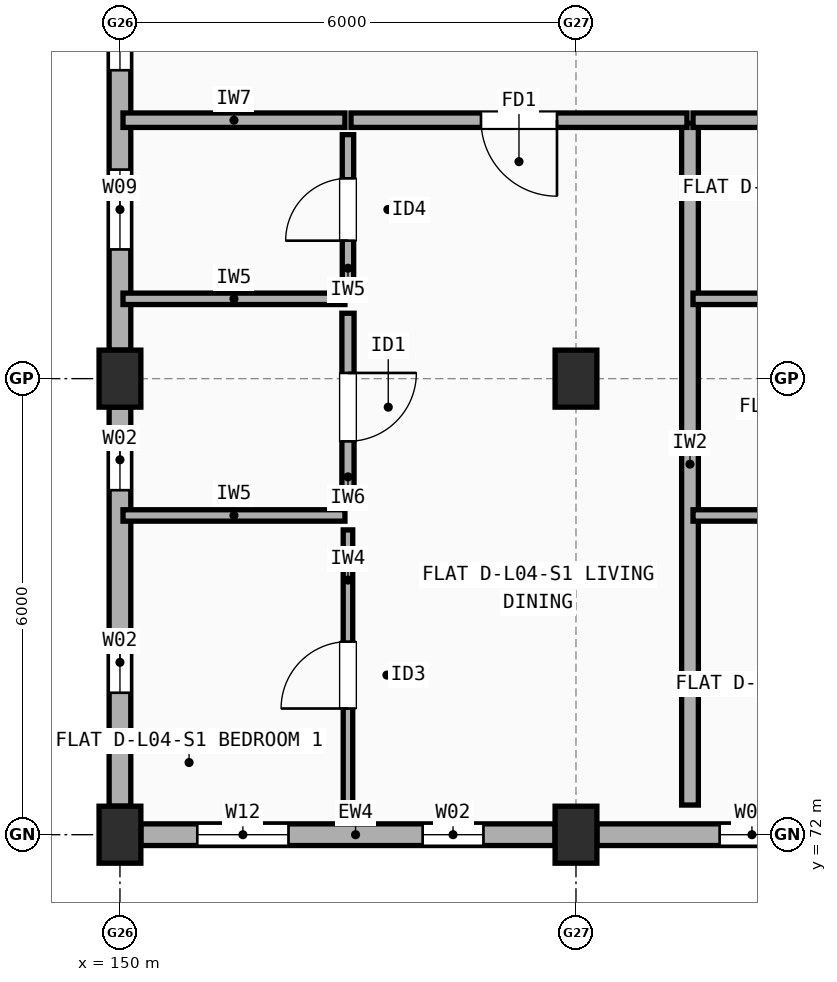
"""IFC4 building model, lengths in metres.
Left out: names, types, materials, properties, quantities, classifications, styles, units other than length and angle.
Written with IfcOpenShell. Run it as: python <this file> out.ifc"""

import sys

from ifc_helpers import new_model, si_unit, direction, frame, frame_2d, origin, origin_2d, place, context, subcontext, project, spatial, rectangle, extrude, element, fill, save


model = new_model("IFC4")
c1 = context("Model", 3, precision=1e-05, world=origin(), true_north=direction((0.0, 1.0)))
c2 = subcontext(c1, "Body", "Model", "MODEL_VIEW")
j1 = project(units=[si_unit("LENGTHUNIT", "METRE"), si_unit("PLANEANGLEUNIT", "RADIAN")], contexts=[c1])
p1 = place(None, origin())
s1 = spatial("IfcSite", under=j1, at=p1, CompositionType="ELEMENT")
p2 = place(p1, origin())
s2 = spatial("IfcBuilding", under=s1, at=p2, CompositionType="ELEMENT")
p3 = place(p2, frame((0.0, 0.0, 14.1)))
s3 = spatial("IfcBuildingStorey", under=s2, at=p3, CompositionType="ELEMENT", Elevation=14.1)
for number, where, z_axis, x_axis in (
    (1, (150.0, 72.0, 0.0), (0.0, 0.0, 1.0), (1.0, 0.0, 0.0)),
    (2, (150.0, 78.0, 0.0), (0.0, 0.0, 1.0), (1.0, 0.0, 0.0)),
    (3, (156.0, 72.0, 0.0), (0.0, 0.0, 1.0), (1.0, 0.0, 0.0)),
    (4, (156.0, 78.0, 0.0), (0.0, 0.0, 1.0), (1.0, 0.0, 0.0)),
):
    element("IfcColumn", number, at=place(p3, frame(where, z_axis=z_axis, x_axis=x_axis)), inside=s3, PredefinedType="COLUMN", context=c2, shape_type="SweptSolid", body=[
        extrude(rectangle(XDim=0.55, YDim=0.75, at=origin_2d()), origin(), (0.0, 0.0, 1.0), 2.95),
    ])
p4 = place(p3, frame((150.275, 72.0, 0.0), z_axis=(0.0, 0.0, 1.0), x_axis=(1.0, 0.0, 0.0)))
e5 = element("IfcWall", 5, at=p4, inside=s3, PredefinedType="STANDARD", context=c2, shape_type="SweptSolid", body=[
    extrude(rectangle(XDim=5.45, YDim=0.285, at=frame_2d((2.725, 0.0))), origin(), (0.0, 0.0, 1.0), 2.432),
])
p5 = place(p4, frame((0.742, 0.0, 0.9)))
e6 = element("IfcOpeningElement", 6, at=p5, cuts=e5, PredefinedType="OPENING", context=c2, shape_type="SweptSolid", body=[
    extrude(rectangle(XDim=1.2, YDim=1.35, at=frame_2d((0.6, 0.675))), frame((0.0, 0.152, 0.0), z_axis=(0.0, -1.0, 0.0), x_axis=(1.0, 0.0, 0.0)), (0.0, 0.0, 1.0), 0.305),
])
p6 = place(p4, frame((3.708, 0.0, 0.9)))
e7 = element("IfcOpeningElement", 7, at=p6, cuts=e5, PredefinedType="OPENING", context=c2, shape_type="SweptSolid", body=[
    extrude(rectangle(XDim=0.8, YDim=1.2, at=frame_2d((0.4, 0.6))), frame((0.0, 0.152, 0.0), z_axis=(0.0, -1.0, 0.0), x_axis=(1.0, 0.0, 0.0)), (0.0, 0.0, 1.0), 0.305),
])
p7 = place(p3, frame((156.275, 72.0, 0.0), z_axis=(0.0, 0.0, 1.0), x_axis=(1.0, 0.0, 0.0)))
e8 = element("IfcWall", 8, at=p7, inside=s3, PredefinedType="STANDARD", context=c2, shape_type="SweptSolid", body=[
    extrude(rectangle(XDim=5.4, YDim=0.285, at=frame_2d((2.7, 0.0))), origin(), (0.0, 0.0, 1.0), 2.432),
])
p8 = place(p7, frame((1.615, 0.0, 0.9)))
e9 = element("IfcOpeningElement", 9, at=p8, cuts=e8, PredefinedType="OPENING", context=c2, shape_type="SweptSolid", body=[
    extrude(rectangle(XDim=0.85, YDim=1.25, at=frame_2d((0.425, 0.625))), frame((0.0, 0.152, 0.0), z_axis=(0.0, -1.0, 0.0), x_axis=(1.0, 0.0, 0.0)), (0.0, 0.0, 1.0), 0.305),
])
p9 = place(p7, frame((4.2, 0.0, 0.9)))
e10 = element("IfcOpeningElement", 10, at=p9, cuts=e8, PredefinedType="OPENING", context=c2, shape_type="SweptSolid", body=[
    extrude(rectangle(XDim=0.85, YDim=1.25, at=frame_2d((0.425, 0.625))), frame((0.0, 0.152, 0.0), z_axis=(0.0, -1.0, 0.0), x_axis=(1.0, 0.0, 0.0)), (0.0, 0.0, 1.0), 0.305),
])
p10 = place(p3, frame((150.0, 83.625, 0.0), z_axis=(0.0, 0.0, 1.0), x_axis=(0.0, -1.0, 0.0)))
e11 = element("IfcWall", 11, at=p10, inside=s3, PredefinedType="STANDARD", context=c2, shape_type="SweptSolid", body=[
    extrude(rectangle(XDim=5.25, YDim=0.285, at=frame_2d((2.625, 0.0))), origin(), (0.0, 0.0, 1.0), 2.432),
])
p11 = place(p10, frame((0.617, 0.0, 0.9)))
e12 = element("IfcOpeningElement", 12, at=p11, cuts=e11, PredefinedType="OPENING", context=c2, shape_type="SweptSolid", body=[
    extrude(rectangle(XDim=0.95, YDim=1.35, at=frame_2d((0.475, 0.675))), frame((0.0, 0.152, 0.0), z_axis=(0.0, -1.0, 0.0), x_axis=(1.0, 0.0, 0.0)), (0.0, 0.0, 1.0), 0.305),
])
p12 = place(p10, frame((2.875, 0.0, 0.9)))
e13 = element("IfcOpeningElement", 13, at=p12, cuts=e11, PredefinedType="OPENING", context=c2, shape_type="SweptSolid", body=[
    extrude(rectangle(XDim=1.05, YDim=1.35, at=frame_2d((0.525, 0.675))), frame((0.0, 0.152, 0.0), z_axis=(0.0, -1.0, 0.0), x_axis=(1.0, 0.0, 0.0)), (0.0, 0.0, 1.0), 0.305),
])
p13 = place(p3, frame((150.0, 77.625, 0.0), z_axis=(0.0, 0.0, 1.0), x_axis=(0.0, -1.0, 0.0)))
e14 = element("IfcWall", 14, at=p13, inside=s3, PredefinedType="STANDARD", context=c2, shape_type="SweptSolid", body=[
    extrude(rectangle(XDim=5.25, YDim=0.285, at=frame_2d((2.625, 0.0))), origin(), (0.0, 0.0, 1.0), 2.432),
])
p14 = place(p13, frame((0.292, 0.0, 0.9)))
e15 = element("IfcOpeningElement", 15, at=p14, cuts=e14, PredefinedType="OPENING", context=c2, shape_type="SweptSolid", body=[
    extrude(rectangle(XDim=0.8, YDim=1.2, at=frame_2d((0.4, 0.6))), frame((0.0, 0.152, 0.0), z_axis=(0.0, -1.0, 0.0), x_axis=(1.0, 0.0, 0.0)), (0.0, 0.0, 1.0), 0.305),
])
p15 = place(p13, frame((2.958, 0.0, 0.9)))
e16 = element("IfcOpeningElement", 16, at=p15, cuts=e14, PredefinedType="OPENING", context=c2, shape_type="SweptSolid", body=[
    extrude(rectangle(XDim=0.8, YDim=1.2, at=frame_2d((0.4, 0.6))), frame((0.0, 0.152, 0.0), z_axis=(0.0, -1.0, 0.0), x_axis=(1.0, 0.0, 0.0)), (0.0, 0.0, 1.0), 0.305),
])
p16 = place(p3, frame((157.5, 72.39, 0.0), z_axis=(0.0, 0.0, 1.0), x_axis=(0.0, 1.0, 0.0)))
e17 = element("IfcWall", 17, at=p16, inside=s3, PredefinedType="SOLIDWALL", context=c2, shape_type="SweptSolid", body=[
    extrude(rectangle(XDim=8.97, YDim=0.22, at=frame_2d((4.485, 0.0))), origin(), (0.0, 0.0, 1.0), 2.432),
])
p17 = place(p3, frame((150.04, 81.4, 0.0), z_axis=(0.0, 0.0, 1.0), x_axis=(1.0, 0.0, 0.0)))
e18 = element("IfcWall", 18, at=p17, inside=s3, PredefinedType="SOLIDWALL", context=c2, shape_type="SweptSolid", body=[
    extrude(rectangle(XDim=2.92, YDim=0.19, at=frame_2d((1.46, 0.0))), origin(), (0.0, 0.0, 1.0), 2.432),
])
p18 = place(p3, frame((153.04, 81.4, 0.0), z_axis=(0.0, 0.0, 1.0), x_axis=(1.0, 0.0, 0.0)))
e19 = element("IfcWall", 19, at=p18, inside=s3, PredefinedType="SOLIDWALL", context=c2, shape_type="SweptSolid", body=[
    extrude(rectangle(XDim=4.42, YDim=0.19, at=frame_2d((2.21, 0.0))), origin(), (0.0, 0.0, 1.0), 2.432),
])
p19 = place(p18, frame((1.71, 0.0, 0.0)))
e20 = element("IfcOpeningElement", 20, at=p19, cuts=e19, PredefinedType="OPENING", context=c2, shape_type="SweptSolid", body=[
    extrude(rectangle(XDim=1.0, YDim=2.15, at=frame_2d((0.5, 1.075))), frame((0.0, 0.105, 0.0), z_axis=(0.0, -1.0, 0.0), x_axis=(1.0, 0.0, 0.0)), (0.0, 0.0, 1.0), 0.21),
])
p20 = place(p3, frame((153.0, 72.19, 0.0), z_axis=(0.0, 0.0, 1.0), x_axis=(0.0, 1.0, 0.0)))
e21 = element("IfcWall", 21, at=p20, inside=s3, PredefinedType="PARTITIONING", context=c2, shape_type="SweptSolid", body=[
    extrude(rectangle(XDim=3.82, YDim=0.125, at=frame_2d((1.91, 0.0))), origin(), (0.0, 0.0, 1.0), 2.95),
])
p21 = place(p20, frame((1.47, 0.0, 0.0)))
e22 = element("IfcOpeningElement", 22, at=p21, cuts=e21, PredefinedType="OPENING", context=c2, shape_type="SweptSolid", body=[
    extrude(rectangle(XDim=0.88, YDim=2.1, at=frame_2d((0.44, 1.05))), frame((0.0, 0.073, 0.0), z_axis=(0.0, -1.0, 0.0), x_axis=(1.0, 0.0, 0.0)), (0.0, 0.0, 1.0), 0.145),
])
p22 = place(p3, frame((153.0, 76.39, 0.0), z_axis=(0.0, 0.0, 1.0), x_axis=(0.0, 1.0, 0.0)))
e23 = element("IfcWall", 23, at=p22, inside=s3, PredefinedType="PLUMBINGWALL", context=c2, shape_type="SweptSolid", body=[
    extrude(rectangle(XDim=2.47, YDim=0.16, at=frame_2d((1.235, 0.0))), origin(), (0.0, 0.0, 1.0), 2.432),
])
p23 = place(p22, frame((0.785, 0.0, 0.0)))
e24 = element("IfcOpeningElement", 24, at=p23, cuts=e23, PredefinedType="OPENING", context=c2, shape_type="SweptSolid", body=[
    extrude(rectangle(XDim=0.9, YDim=2.1, at=frame_2d((0.45, 1.05))), frame((0.0, 0.09, 0.0), z_axis=(0.0, -1.0, 0.0), x_axis=(1.0, 0.0, 0.0)), (0.0, 0.0, 1.0), 0.18),
])
p24 = place(p3, frame((153.0, 79.24, 0.0), z_axis=(0.0, 0.0, 1.0), x_axis=(0.0, 1.0, 0.0)))
e25 = element("IfcWall", 25, at=p24, inside=s3, PredefinedType="PARTITIONING", context=c2, shape_type="SweptSolid", body=[
    extrude(rectangle(XDim=1.97, YDim=0.15, at=frame_2d((0.985, 0.0))), origin(), (0.0, 0.0, 1.0), 2.95),
])
p25 = place(p24, frame((0.575, 0.0, 0.0)))
e26 = element("IfcOpeningElement", 26, at=p25, cuts=e25, PredefinedType="OPENING", context=c2, shape_type="SweptSolid", body=[
    extrude(rectangle(XDim=0.82, YDim=2.08, at=frame_2d((0.41, 1.04))), frame((0.0, 0.085, 0.0), z_axis=(0.0, -1.0, 0.0), x_axis=(1.0, 0.0, 0.0)), (0.0, 0.0, 1.0), 0.17),
])
for number, where, z_axis, x_axis in (
    (27, (150.04, 76.2, 0.0), (0.0, 0.0, 1.0), (1.0, 0.0, 0.0)),
    (28, (150.04, 79.05, 0.0), (0.0, 0.0, 1.0), (1.0, 0.0, 0.0)),
):
    element("IfcWall", number, at=place(p3, frame(where, z_axis=z_axis, x_axis=x_axis)), inside=s3, PredefinedType="PARTITIONING", context=c2, shape_type="SweptSolid", body=[
        extrude(rectangle(XDim=2.92, YDim=0.15, at=frame_2d((1.46, 0.0))), origin(), (0.0, 0.0, 1.0), 2.432),
    ])
p26 = place(p3, frame((157.54, 81.4, 0.0), z_axis=(0.0, 0.0, 1.0), x_axis=(1.0, 0.0, 0.0)))
e29 = element("IfcWall", 29, at=p26, inside=s3, PredefinedType="SOLIDWALL", context=c2, shape_type="SweptSolid", body=[
    extrude(rectangle(XDim=4.42, YDim=0.19, at=frame_2d((2.21, 0.0))), origin(), (0.0, 0.0, 1.0), 2.508),
])
p27 = place(p3, frame((157.54, 76.2, 0.0), z_axis=(0.0, 0.0, 1.0), x_axis=(1.0, 0.0, 0.0)))
e30 = element("IfcWall", 30, at=p27, inside=s3, PredefinedType="PARTITIONING", context=c2, shape_type="SweptSolid", body=[
    extrude(rectangle(XDim=4.42, YDim=0.15, at=frame_2d((2.21, 0.0))), origin(), (0.0, 0.0, 1.0), 2.548),
])
p28 = place(p3, frame((157.54, 79.05, 0.0), z_axis=(0.0, 0.0, 1.0), x_axis=(1.0, 0.0, 0.0)))
e31 = element("IfcWall", 31, at=p28, inside=s3, PredefinedType="PARTITIONING", context=c2, shape_type="SweptSolid", body=[
    extrude(rectangle(XDim=4.42, YDim=0.15, at=frame_2d((2.21, 0.0))), origin(), (0.0, 0.0, 1.0), 2.508),
])
p29 = place(p5, origin())
e32 = element("IfcWindow", 32, at=p29, inside=s3, PartitioningType="SINGLE_PANEL", PredefinedType="WINDOW", context=c2, shape_type="SweptSolid", body=[
    extrude(rectangle(XDim=1.2, YDim=1.35, at=frame_2d((0.6, 0.675))), frame((0.0, 0.03, 0.0), z_axis=(0.0, -1.0, 0.0), x_axis=(1.0, 0.0, 0.0)), (0.0, 0.0, 1.0), 0.06),
])
fill(e6, e32)
p30 = place(p6, origin())
e33 = element("IfcWindow", 33, at=p30, inside=s3, PartitioningType="SINGLE_PANEL", PredefinedType="WINDOW", context=c2, shape_type="SweptSolid", body=[
    extrude(rectangle(XDim=0.8, YDim=1.2, at=frame_2d((0.4, 0.6))), frame((0.0, 0.03, 0.0), z_axis=(0.0, -1.0, 0.0), x_axis=(1.0, 0.0, 0.0)), (0.0, 0.0, 1.0), 0.06),
])
fill(e7, e33)
p31 = place(p8, origin())
e34 = element("IfcWindow", 34, at=p31, inside=s3, PartitioningType="SINGLE_PANEL", PredefinedType="WINDOW", context=c2, shape_type="SweptSolid", body=[
    extrude(rectangle(XDim=0.85, YDim=1.25, at=frame_2d((0.425, 0.625))), frame((0.0, 0.03, 0.0), z_axis=(0.0, -1.0, 0.0), x_axis=(1.0, 0.0, 0.0)), (0.0, 0.0, 1.0), 0.06),
])
fill(e9, e34)
p32 = place(p11, origin())
e35 = element("IfcWindow", 35, at=p32, inside=s3, PartitioningType="SINGLE_PANEL", PredefinedType="WINDOW", context=c2, shape_type="SweptSolid", body=[
    extrude(rectangle(XDim=0.95, YDim=1.35, at=frame_2d((0.475, 0.675))), frame((0.0, 0.03, 0.0), z_axis=(0.0, -1.0, 0.0), x_axis=(1.0, 0.0, 0.0)), (0.0, 0.0, 1.0), 0.06),
])
fill(e12, e35)
p33 = place(p12, origin())
e36 = element("IfcWindow", 36, at=p33, inside=s3, PartitioningType="SINGLE_PANEL", PredefinedType="WINDOW", context=c2, shape_type="SweptSolid", body=[
    extrude(rectangle(XDim=1.05, YDim=1.35, at=frame_2d((0.525, 0.675))), frame((0.0, 0.03, 0.0), z_axis=(0.0, -1.0, 0.0), x_axis=(1.0, 0.0, 0.0)), (0.0, 0.0, 1.0), 0.06),
])
fill(e13, e36)
p34 = place(p14, origin())
e37 = element("IfcWindow", 37, at=p34, inside=s3, PartitioningType="SINGLE_PANEL", PredefinedType="WINDOW", context=c2, shape_type="SweptSolid", body=[
    extrude(rectangle(XDim=0.8, YDim=1.2, at=frame_2d((0.4, 0.6))), frame((0.0, 0.03, 0.0), z_axis=(0.0, -1.0, 0.0), x_axis=(1.0, 0.0, 0.0)), (0.0, 0.0, 1.0), 0.06),
])
fill(e15, e37)
p35 = place(p15, origin())
e38 = element("IfcWindow", 38, at=p35, inside=s3, PartitioningType="SINGLE_PANEL", PredefinedType="WINDOW", context=c2, shape_type="SweptSolid", body=[
    extrude(rectangle(XDim=0.8, YDim=1.2, at=frame_2d((0.4, 0.6))), frame((0.0, 0.03, 0.0), z_axis=(0.0, -1.0, 0.0), x_axis=(1.0, 0.0, 0.0)), (0.0, 0.0, 1.0), 0.06),
])
fill(e16, e38)
p36 = place(p19, origin())
e39 = element("IfcDoor", 39, at=p36, inside=s3, OperationType="SINGLE_SWING_RIGHT", PredefinedType="DOOR", context=c2, shape_type="SweptSolid", body=[
    extrude(rectangle(XDim=1.0, YDim=2.15, at=frame_2d((0.5, 1.075))), frame((0.0, 0.025, 0.0), z_axis=(0.0, -1.0, 0.0), x_axis=(1.0, 0.0, 0.0)), (0.0, 0.0, 1.0), 0.05),
])
fill(e20, e39)
p37 = place(p21, origin())
e40 = element("IfcDoor", 40, at=p37, inside=s3, OperationType="SINGLE_SWING_LEFT", PredefinedType="DOOR", context=c2, shape_type="SweptSolid", body=[
    extrude(rectangle(XDim=0.88, YDim=2.1, at=frame_2d((0.44, 1.05))), frame((0.0, 0.025, 0.0), z_axis=(0.0, -1.0, 0.0), x_axis=(1.0, 0.0, 0.0)), (0.0, 0.0, 1.0), 0.05),
])
fill(e22, e40)
p38 = place(p23, origin())
e41 = element("IfcDoor", 41, at=p38, inside=s3, OperationType="SINGLE_SWING_RIGHT", PredefinedType="DOOR", context=c2, shape_type="SweptSolid", body=[
    extrude(rectangle(XDim=0.9, YDim=2.1, at=frame_2d((0.45, 1.05))), frame((0.0, 0.025, 0.0), z_axis=(0.0, -1.0, 0.0), x_axis=(1.0, 0.0, 0.0)), (0.0, 0.0, 1.0), 0.05),
])
fill(e24, e41)
p39 = place(p25, origin())
e42 = element("IfcDoor", 42, at=p39, inside=s3, OperationType="SINGLE_SWING_LEFT", PredefinedType="DOOR", context=c2, shape_type="SweptSolid", body=[
    extrude(rectangle(XDim=0.82, YDim=2.08, at=frame_2d((0.41, 1.04))), frame((0.0, 0.025, 0.0), z_axis=(0.0, -1.0, 0.0), x_axis=(1.0, 0.0, 0.0)), (0.0, 0.0, 1.0), 0.05),
])
fill(e26, e42)
save(model, sys.argv[1])
